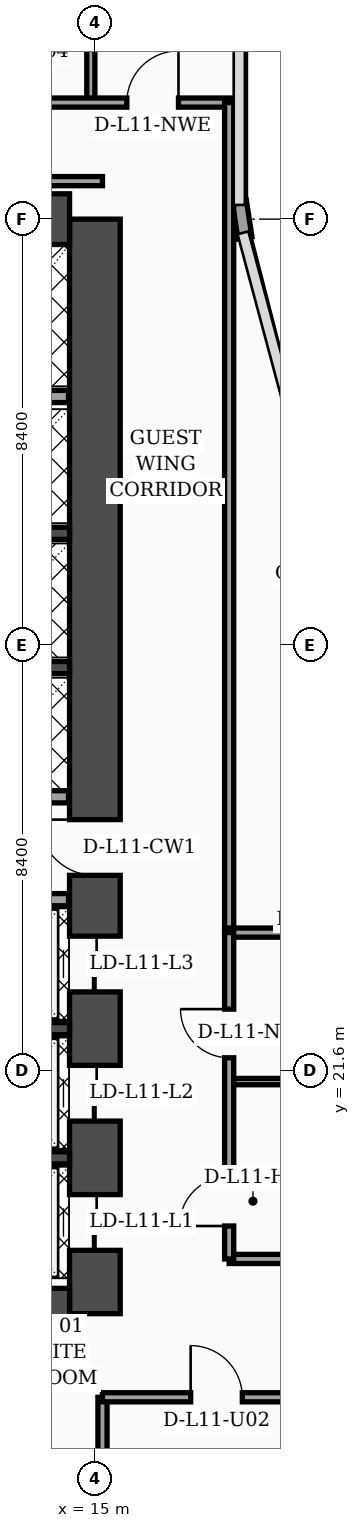
"""IFC4 building model, lengths in metres.
Left out: names, types, materials, properties, quantities, classifications, styles, units other than length and angle.
Written with IfcOpenShell. Run it as: python <this file> out.ifc"""

import sys

from ifc_helpers import new_model, si_unit, direction, frame, frame_2d, origin, place, context, subcontext, project, spatial, rectangle, extrude, element, fill, save


model = new_model("IFC4")
c1 = context("Model", 3, precision=1e-05, world=origin(), true_north=direction((0.0, 1.0)))
c2 = subcontext(c1, "Body", "Model", "MODEL_VIEW")
j1 = project(units=[si_unit("LENGTHUNIT", "METRE"), si_unit("PLANEANGLEUNIT", "RADIAN")], contexts=[c1])
p1 = place(None, origin())
s1 = spatial("IfcSite", under=j1, at=p1, CompositionType="ELEMENT")
p2 = place(p1, origin())
s2 = spatial("IfcBuilding", under=s1, at=p2, CompositionType="ELEMENT")
p3 = place(p2, frame((0.0, 0.0, 50.8)))
s3 = spatial("IfcBuildingStorey", under=s2, at=p3, CompositionType="ELEMENT", Elevation=50.8)
p4 = place(p3, frame((15.0, 16.8, 0.0), z_axis=(0.0, 0.0, 1.0), x_axis=(0.0, 1.0, 0.0)))
e1 = element("IfcWall", 1, at=p4, inside=s3, PredefinedType="SHEAR", context=c2, shape_type="SweptSolid", body=[
    extrude(rectangle(XDim=21.6, YDim=1.0, at=frame_2d((10.8, 0.0))), origin(), (0.0, 0.0, 1.0), 3.56),
])
p5 = place(p4, frame((8.65, 0.0, 0.0)))
e2 = element("IfcOpeningElement", 2, at=p5, cuts=e1, PredefinedType="OPENING", context=c2, shape_type="SweptSolid", body=[
    extrude(rectangle(XDim=1.1, YDim=2.2, at=frame_2d((0.55, 1.1))), frame((0.0, 0.51, 0.0), z_axis=(0.0, -1.0, 0.0), x_axis=(1.0, 0.0, 0.0)), (0.0, 0.0, 1.0), 1.02),
])
p6 = place(p4, frame((1.25, 0.0, 0.0)))
e3 = element("IfcOpeningElement", 3, at=p6, cuts=e1, PredefinedType="OPENING", context=c2, shape_type="SweptSolid", body=[
    extrude(rectangle(XDim=1.1, YDim=2.2, at=frame_2d((0.55, 1.1))), frame((0.0, 0.51, 0.0), z_axis=(0.0, -1.0, 0.0), x_axis=(1.0, 0.0, 0.0)), (0.0, 0.0, 1.0), 1.02),
])
p7 = place(p4, frame((3.8, 0.0, 0.0)))
e4 = element("IfcOpeningElement", 4, at=p7, cuts=e1, PredefinedType="OPENING", context=c2, shape_type="SweptSolid", body=[
    extrude(rectangle(XDim=1.1, YDim=2.2, at=frame_2d((0.55, 1.1))), frame((0.0, 0.51, 0.0), z_axis=(0.0, -1.0, 0.0), x_axis=(1.0, 0.0, 0.0)), (0.0, 0.0, 1.0), 1.02),
])
p8 = place(p4, frame((6.35, 0.0, 0.0)))
e5 = element("IfcOpeningElement", 5, at=p8, cuts=e1, PredefinedType="OPENING", context=c2, shape_type="SweptSolid", body=[
    extrude(rectangle(XDim=1.1, YDim=2.2, at=frame_2d((0.55, 1.1))), frame((0.0, 0.51, 0.0), z_axis=(0.0, -1.0, 0.0), x_axis=(1.0, 0.0, 0.0)), (0.0, 0.0, 1.0), 1.02),
])
for number, where, z_axis, x_axis in (
    (6, (4.7, 38.4, 0.0), (0.0, 0.0, 1.0), (1.0, 0.0, 0.0)),
    (7, (4.7, 16.8, 0.0), (0.0, 0.0, 1.0), (1.0, 0.0, 0.0)),
):
    element("IfcWall", number, at=place(p3, frame(where, z_axis=z_axis, x_axis=x_axis)), inside=s3, PredefinedType="SHEAR", context=c2, shape_type="SweptSolid", body=[
        extrude(rectangle(XDim=9.8, YDim=1.0, at=frame_2d((4.9, 0.0))), origin(), (0.0, 0.0, 1.0), 3.56),
    ])
for number, where, z_axis, x_axis in (
    (8, (12.18, 19.875, 0.0), (0.0, 0.0, 1.0), (1.0, 0.0, 0.0)),
    (9, (12.18, 22.425, 0.0), (0.0, 0.0, 1.0), (1.0, 0.0, 0.0)),
    (10, (12.18, 29.55, 0.0), (0.0, 0.0, 1.0), (1.0, 0.0, 0.0)),
    (11, (12.18, 32.2, 0.0), (0.0, 0.0, 1.0), (1.0, 0.0, 0.0)),
):
    element("IfcWall", number, at=place(p3, frame(where, z_axis=z_axis, x_axis=x_axis)), inside=s3, PredefinedType="SOLIDWALL", context=c2, shape_type="SweptSolid", body=[
        extrude(rectangle(XDim=2.32, YDim=0.24, at=frame_2d((1.16, 0.0))), origin(), (0.0, 0.0, 1.0), 3.56),
    ])
p9 = place(p3, frame((17.962, 38.03, 0.0), z_axis=(0.0, 0.0, 1.0), x_axis=(-0.15141125477, 0.988470855377, 0.0)))
e12 = element("IfcWall", 12, at=p9, inside=s3, PredefinedType="SOLIDWALL", context=c2, shape_type="SweptSolid", body=[
    extrude(rectangle(XDim=0.739, YDim=0.28, at=frame_2d((0.369, 0.0))), origin(), (0.0, 0.0, 1.0), 3.56),
])
p10 = place(p3, frame((12.15, 24.97, 0.0), z_axis=(0.0, 0.0, 1.0), x_axis=(1.0, 0.0, 0.0)))
e13 = element("IfcWall", 13, at=p10, inside=s3, PredefinedType="SOLIDWALL", context=c2, shape_type="SweptSolid", body=[
    extrude(rectangle(XDim=2.33, YDim=0.24, at=frame_2d((1.165, 0.0))), origin(), (0.0, 0.0, 1.0), 2.84),
])
p11 = place(p3, frame((12.25, 27.0, 0.0), z_axis=(0.0, 0.0, 1.0), x_axis=(1.0, 0.0, 0.0)))
e14 = element("IfcWall", 14, at=p11, inside=s3, PredefinedType="SOLIDWALL", context=c2, shape_type="SweptSolid", body=[
    extrude(rectangle(XDim=2.23, YDim=0.24, at=frame_2d((1.115, 0.0))), origin(), (0.0, 0.0, 1.0), 3.56),
])
p12 = place(p3, frame((9.66, 34.9, 0.0), z_axis=(0.0, 0.0, 1.0), x_axis=(1.0, 0.0, 0.0)))
e15 = element("IfcWall", 15, at=p12, inside=s3, PredefinedType="SOLIDWALL", context=c2, shape_type="SweptSolid", body=[
    extrude(rectangle(XDim=4.82, YDim=0.24, at=frame_2d((2.41, 0.0))), origin(), (0.0, 0.0, 1.0), 3.56),
])
p13 = place(p3, frame((15.15, 2.44, 0.0), z_axis=(0.0, 0.0, 1.0), x_axis=(0.0, 1.0, 0.0)))
e16 = element("IfcWall", 16, at=p13, inside=s3, PredefinedType="PARTITIONING", context=c2, shape_type="SweptSolid", body=[
    extrude(rectangle(XDim=12.71, YDim=0.18, at=frame_2d((6.355, 0.0))), origin(), (0.0, 0.0, 1.0), 3.04),
])
p14 = place(p3, frame((15.15, 15.15, 0.0), z_axis=(0.0, 0.0, 1.0), x_axis=(1.0, 0.0, 0.0)))
e17 = element("IfcWall", 17, at=p14, inside=s3, PredefinedType="PARTITIONING", context=c2, shape_type="SweptSolid", body=[
    extrude(rectangle(XDim=6.45, YDim=0.18, at=frame_2d((3.225, 0.0))), origin(), (0.0, 0.0, 1.0), 2.34),
])
p15 = place(p14, frame((1.74, 0.0, 0.0)))
e18 = element("IfcOpeningElement", 18, at=p15, cuts=e17, PredefinedType="OPENING", context=c2, shape_type="SweptSolid", body=[
    extrude(rectangle(XDim=1.02, YDim=2.2, at=frame_2d((0.51, 1.1))), frame((0.0, 0.1, 0.0), z_axis=(0.0, -1.0, 0.0), x_axis=(1.0, 0.0, 0.0)), (0.0, 0.0, 1.0), 0.2),
])
p16 = place(p3, frame((14.92, 40.7, 0.0), z_axis=(0.0, 0.0, 1.0), x_axis=(0.0, 1.0, 0.0)))
e19 = element("IfcWall", 19, at=p16, inside=s3, PredefinedType="PARTITIONING", context=c2, shape_type="SweptSolid", body=[
    extrude(rectangle(XDim=7.1, YDim=0.16, at=frame_2d((3.55, 0.0))), origin(), (0.0, 0.0, 1.0), 3.04),
])
p17 = place(p3, frame((0.08, 40.7, 0.0), z_axis=(0.0, 0.0, 1.0), x_axis=(1.0, 0.0, 0.0)))
e20 = element("IfcWall", 20, at=p17, inside=s3, PredefinedType="PARTITIONING", context=c2, shape_type="SweptSolid", body=[
    extrude(rectangle(XDim=17.77, YDim=0.18, at=frame_2d((8.885, 0.0))), origin(), (0.0, 0.0, 1.0), 2.84),
])
p18 = place(p17, frame((0.9, 0.0, 0.0)))
e21 = element("IfcOpeningElement", 21, at=p18, cuts=e20, PredefinedType="OPENING", context=c2, shape_type="SweptSolid", body=[
    extrude(rectangle(XDim=1.02, YDim=2.2, at=frame_2d((0.51, 1.1))), frame((0.0, 0.1, 0.0), z_axis=(0.0, -1.0, 0.0), x_axis=(1.0, 0.0, 0.0)), (0.0, 0.0, 1.0), 0.2),
])
p19 = place(p17, frame((4.9, 0.0, 0.0)))
e22 = element("IfcOpeningElement", 22, at=p19, cuts=e20, PredefinedType="OPENING", context=c2, shape_type="SweptSolid", body=[
    extrude(rectangle(XDim=1.02, YDim=2.2, at=frame_2d((0.51, 1.1))), frame((0.0, 0.1, 0.0), z_axis=(0.0, -1.0, 0.0), x_axis=(1.0, 0.0, 0.0)), (0.0, 0.0, 1.0), 0.2),
])
p20 = place(p17, frame((10.78, 0.0, 0.0)))
e23 = element("IfcOpeningElement", 23, at=p20, cuts=e20, PredefinedType="OPENING", context=c2, shape_type="SweptSolid", body=[
    extrude(rectangle(XDim=1.02, YDim=2.2, at=frame_2d((0.51, 1.1))), frame((0.0, 0.1, 0.0), z_axis=(0.0, -1.0, 0.0), x_axis=(1.0, 0.0, 0.0)), (0.0, 0.0, 1.0), 0.2),
])
p21 = place(p17, frame((15.55, 0.0, 0.0)))
e24 = element("IfcOpeningElement", 24, at=p21, cuts=e20, PredefinedType="OPENING", context=c2, shape_type="SweptSolid", body=[
    extrude(rectangle(XDim=1.02, YDim=2.2, at=frame_2d((0.51, 1.1))), frame((0.0, 0.1, 0.0), z_axis=(0.0, -1.0, 0.0), x_axis=(1.0, 0.0, 0.0)), (0.0, 0.0, 1.0), 0.2),
])
p22 = place(p3, frame((17.65, 24.3, 0.0), z_axis=(0.0, 0.0, 1.0), x_axis=(0.0, 1.0, 0.0)))
e25 = element("IfcWall", 25, at=p22, inside=s3, PredefinedType="PARTITIONING", context=c2, shape_type="SweptSolid", body=[
    extrude(rectangle(XDim=16.4, YDim=0.18, at=frame_2d((8.2, 0.0))), origin(), (0.0, 0.0, 1.0), 2.84),
])
p23 = place(p3, frame((3.68, 39.15, 0.0), z_axis=(0.0, 0.0, 1.0), x_axis=(1.0, 0.0, 0.0)))
e26 = element("IfcWall", 26, at=p23, inside=s3, PredefinedType="PARTITIONING", context=c2, shape_type="SweptSolid", body=[
    extrude(rectangle(XDim=11.47, YDim=0.18, at=frame_2d((5.735, 0.0))), origin(), (0.0, 0.0, 1.0), 2.84),
])
p24 = place(p3, frame((17.65, 17.88, 0.0), z_axis=(0.0, 0.0, 1.0), x_axis=(1.0, 0.0, 0.0)))
e27 = element("IfcWall", 27, at=p24, inside=s3, PredefinedType="PARTITIONING", context=c2, shape_type="SweptSolid", body=[
    extrude(rectangle(XDim=3.9, YDim=0.18, at=frame_2d((1.95, 0.0))), origin(), (0.0, 0.0, 1.0), 3.56),
])
p25 = place(p3, frame((17.65, 21.38, 0.0), z_axis=(0.0, 0.0, 1.0), x_axis=(1.0, 0.0, 0.0)))
e28 = element("IfcWall", 28, at=p25, inside=s3, PredefinedType="PARTITIONING", context=c2, shape_type="SweptSolid", body=[
    extrude(rectangle(XDim=3.9, YDim=0.125, at=frame_2d((1.95, 0.0))), origin(), (0.0, 0.0, 1.0), 3.56),
])
p26 = place(p3, frame((17.65, 24.32, 0.0), z_axis=(0.0, 0.0, 1.0), x_axis=(1.0, 0.0, 0.0)))
e29 = element("IfcWall", 29, at=p26, inside=s3, PredefinedType="PARTITIONING", context=c2, shape_type="SweptSolid", body=[
    extrude(rectangle(XDim=3.95, YDim=0.18, at=frame_2d((1.975, 0.0))), origin(), (0.0, 0.0, 1.0), 3.56),
])
p27 = place(p3, frame((17.65, 17.88, 0.0), z_axis=(0.0, 0.0, 1.0), x_axis=(0.0, 1.0, 0.0)))
e30 = element("IfcWall", 30, at=p27, inside=s3, PredefinedType="PARTITIONING", context=c2, shape_type="SweptSolid", body=[
    extrude(rectangle(XDim=6.44, YDim=0.18, at=frame_2d((3.22, 0.0))), origin(), (0.0, 0.0, 1.0), 3.56),
])
p28 = place(p27, frame((0.65, 0.0, 0.0)))
e31 = element("IfcOpeningElement", 31, at=p28, cuts=e30, PredefinedType="OPENING", context=c2, shape_type="SweptSolid", body=[
    extrude(rectangle(XDim=0.98, YDim=2.15, at=frame_2d((0.49, 1.075))), frame((0.0, 0.1, 0.0), z_axis=(0.0, -1.0, 0.0), x_axis=(1.0, 0.0, 0.0)), (0.0, 0.0, 1.0), 0.2),
])
p29 = place(p27, frame((3.97, 0.0, 0.0)))
e32 = element("IfcOpeningElement", 32, at=p29, cuts=e30, PredefinedType="OPENING", context=c2, shape_type="SweptSolid", body=[
    extrude(rectangle(XDim=0.96, YDim=2.2, at=frame_2d((0.48, 1.1))), frame((0.0, 0.1, 0.0), z_axis=(0.0, -1.0, 0.0), x_axis=(1.0, 0.0, 0.0)), (0.0, 0.0, 1.0), 0.2),
])
p30 = place(p15, origin())
e33 = element("IfcDoor", 33, at=p30, inside=s3, OperationType="SINGLE_SWING_LEFT", PredefinedType="DOOR", context=c2, shape_type="SweptSolid", body=[
    extrude(rectangle(XDim=1.02, YDim=2.2, at=frame_2d((0.51, 1.1))), frame((0.0, 0.025, 0.0), z_axis=(0.0, -1.0, 0.0), x_axis=(1.0, 0.0, 0.0)), (0.0, 0.0, 1.0), 0.05),
])
fill(e18, e33)
p31 = place(p21, origin())
e34 = element("IfcDoor", 34, at=p31, inside=s3, OperationType="SINGLE_SWING_RIGHT", PredefinedType="DOOR", context=c2, shape_type="SweptSolid", body=[
    extrude(rectangle(XDim=1.02, YDim=2.2, at=frame_2d((0.51, 1.1))), frame((0.0, 0.025, 0.0), z_axis=(0.0, -1.0, 0.0), x_axis=(1.0, 0.0, 0.0)), (0.0, 0.0, 1.0), 0.05),
])
fill(e24, e34)
p32 = place(p28, origin())
e35 = element("IfcDoor", 35, at=p32, inside=s3, OperationType="SINGLE_SWING_LEFT", PredefinedType="DOOR", context=c2, shape_type="SweptSolid", body=[
    extrude(rectangle(XDim=0.98, YDim=2.15, at=frame_2d((0.49, 1.075))), frame((0.0, 0.025, 0.0), z_axis=(0.0, -1.0, 0.0), x_axis=(1.0, 0.0, 0.0)), (0.0, 0.0, 1.0), 0.05),
])
fill(e31, e35)
p33 = place(p29, origin())
e36 = element("IfcDoor", 36, at=p33, inside=s3, OperationType="SINGLE_SWING_RIGHT", PredefinedType="DOOR", context=c2, shape_type="SweptSolid", body=[
    extrude(rectangle(XDim=0.96, YDim=2.2, at=frame_2d((0.48, 1.1))), frame((0.0, 0.025, 0.0), z_axis=(0.0, -1.0, 0.0), x_axis=(1.0, 0.0, 0.0)), (0.0, 0.0, 1.0), 0.05),
])
fill(e32, e36)
p34 = place(p5, origin())
e37 = element("IfcDoor", 37, at=p34, inside=s3, OperationType="SINGLE_SWING_RIGHT", PredefinedType="DOOR", context=c2, shape_type="SweptSolid", body=[
    extrude(rectangle(XDim=1.1, YDim=2.2, at=frame_2d((0.55, 1.1))), frame((0.0, 0.025, 0.0), z_axis=(0.0, -1.0, 0.0), x_axis=(1.0, 0.0, 0.0)), (0.0, 0.0, 1.0), 0.05),
])
fill(e2, e37)
p35 = place(p6, origin())
e38 = element("IfcDoor", 38, at=p35, inside=s3, OperationType="DOUBLE_DOOR_SLIDING", PredefinedType="DOOR", context=c2, shape_type="SweptSolid", body=[
    extrude(rectangle(XDim=1.1, YDim=2.2, at=frame_2d((0.55, 1.1))), frame((0.0, 0.025, 0.0), z_axis=(0.0, -1.0, 0.0), x_axis=(1.0, 0.0, 0.0)), (0.0, 0.0, 1.0), 0.05),
])
fill(e3, e38)
p36 = place(p7, origin())
e39 = element("IfcDoor", 39, at=p36, inside=s3, OperationType="DOUBLE_DOOR_SLIDING", PredefinedType="DOOR", context=c2, shape_type="SweptSolid", body=[
    extrude(rectangle(XDim=1.1, YDim=2.2, at=frame_2d((0.55, 1.1))), frame((0.0, 0.025, 0.0), z_axis=(0.0, -1.0, 0.0), x_axis=(1.0, 0.0, 0.0)), (0.0, 0.0, 1.0), 0.05),
])
fill(e4, e39)
p37 = place(p8, origin())
e40 = element("IfcDoor", 40, at=p37, inside=s3, OperationType="DOUBLE_DOOR_SLIDING", PredefinedType="DOOR", context=c2, shape_type="SweptSolid", body=[
    extrude(rectangle(XDim=1.1, YDim=2.2, at=frame_2d((0.55, 1.1))), frame((0.0, 0.025, 0.0), z_axis=(0.0, -1.0, 0.0), x_axis=(1.0, 0.0, 0.0)), (0.0, 0.0, 1.0), 0.05),
])
fill(e5, e40)
save(model, sys.argv[1])
